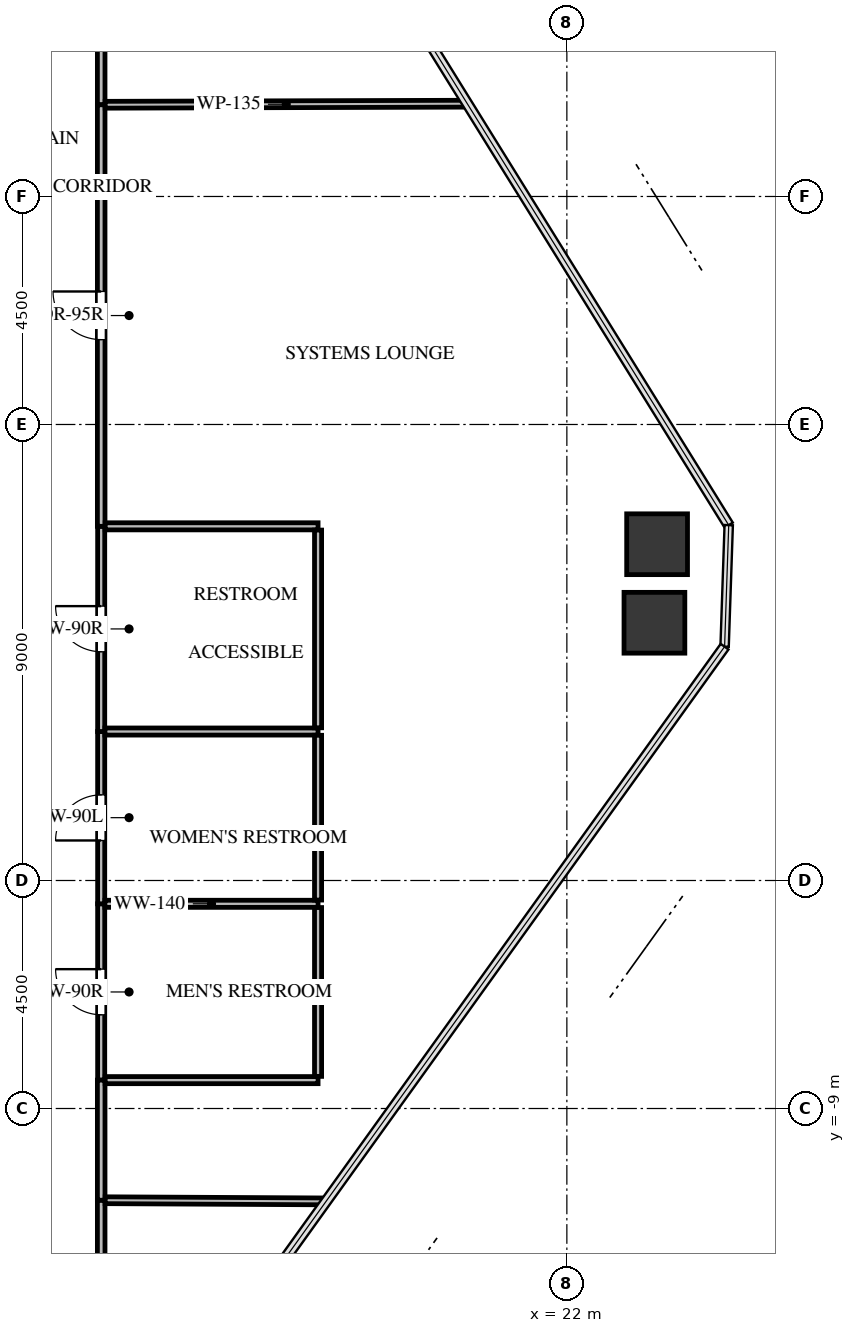
"""IFC4 building model, lengths in metres.
Left out: names, types, materials, properties, quantities, classifications, styles, units other than length and angle.
Written with IfcOpenShell. Run it as: python <this file> out.ifc"""

import sys

from ifc_helpers import new_model, si_unit, direction, frame, frame_2d, origin, origin_2d, place, context, subcontext, project, spatial, rectangle, extrude, source, transform, mapped, element, fill, save


model = new_model("IFC4")
c1 = context("Model", 3, precision=1e-05, world=origin(), true_north=direction((0.0, 1.0)))
c2 = subcontext(c1, "Body", "Model", "MODEL_VIEW")
j1 = project(units=[si_unit("LENGTHUNIT", "METRE"), si_unit("PLANEANGLEUNIT", "RADIAN")], contexts=[c1])
p1 = place(None, origin())
s1 = spatial("IfcSite", under=j1, at=p1, CompositionType="ELEMENT")
p2 = place(p1, origin())
s2 = spatial("IfcBuilding", under=s1, at=p2, CompositionType="ELEMENT")
p3 = place(p2, frame((0.0, 0.0, 100.8)))
s3 = spatial("IfcBuildingStorey", under=s2, at=p3, CompositionType="ELEMENT", Elevation=100.8)
m1 = source(origin(), c2, "Body", "SweptSolid", [
    extrude(rectangle(XDim=1.2, YDim=1.2, at=origin_2d()), origin(), (0.0, 0.0, 1.0), 3.3),
])
for number, where, z_axis, x_axis in (
    (1, (23.781, 2.137, -0.24), (0.0, 0.0, 1.0), (1.0, 0.0, 0.0)),
    (2, (23.728, 0.587, -0.24), (0.0, 0.0, 1.0), (1.0, 0.0, 0.0)),
):
    element("IfcColumn", number, at=place(p3, frame(where, z_axis=z_axis, x_axis=x_axis)), inside=s3, PredefinedType="COLUMN", context=c2, shape_type="MappedRepresentation", body=[
        mapped(m1, transform((0.0, 0.0, 0.0), x_axis=(1.0, 0.0, 0.0), y_axis=(0.0, 1.0, 0.0), z_axis=(0.0, 0.0, 1.0), scale=1.0)),
    ])
p4 = place(p3, frame((12.81, -8.44, 0.0), z_axis=(0.0, 0.0, 1.0), x_axis=(0.0, 1.0, 0.0)))
e3 = element("IfcWall", 3, at=p4, inside=s3, PredefinedType="PARTITIONING", context=c2, shape_type="SweptSolid", body=[
    extrude(rectangle(XDim=3.48, YDim=0.14, at=frame_2d((1.74, 0.0))), origin(), (0.0, 0.0, 1.0), 3.045),
])
p5 = place(p4, frame((1.29, 0.0, 0.0)))
e4 = element("IfcOpeningElement", 4, at=p5, cuts=e3, PredefinedType="OPENING", context=c2, shape_type="SweptSolid", body=[
    extrude(rectangle(XDim=0.9, YDim=2.05, at=frame_2d((0.45, 1.025))), frame((0.0, 0.08, 0.0), z_axis=(0.0, -1.0, 0.0), x_axis=(1.0, 0.0, 0.0)), (0.0, 0.0, 1.0), 0.16),
])
p6 = place(p3, frame((12.81, -4.96, 0.0), z_axis=(0.0, 0.0, 1.0), x_axis=(0.0, 1.0, 0.0)))
e5 = element("IfcWall", 5, at=p6, inside=s3, PredefinedType="PARTITIONING", context=c2, shape_type="SweptSolid", body=[
    extrude(rectangle(XDim=3.4, YDim=0.14, at=frame_2d((1.7, 0.0))), origin(), (0.0, 0.0, 1.0), 3.045),
])
p7 = place(p6, frame((1.25, 0.0, 0.0)))
e6 = element("IfcOpeningElement", 6, at=p7, cuts=e5, PredefinedType="OPENING", context=c2, shape_type="SweptSolid", body=[
    extrude(rectangle(XDim=0.9, YDim=2.05, at=frame_2d((0.45, 1.025))), frame((0.0, 0.08, 0.0), z_axis=(0.0, -1.0, 0.0), x_axis=(1.0, 0.0, 0.0)), (0.0, 0.0, 1.0), 0.16),
])
p8 = place(p3, frame((12.81, -1.56, 0.0), z_axis=(0.0, 0.0, 1.0), x_axis=(0.0, 1.0, 0.0)))
e7 = element("IfcWall", 7, at=p8, inside=s3, PredefinedType="PARTITIONING", context=c2, shape_type="SweptSolid", body=[
    extrude(rectangle(XDim=4.05, YDim=0.14, at=frame_2d((2.025, 0.0))), origin(), (0.0, 0.0, 1.0), 2.212),
])
p9 = place(p8, frame((1.575, 0.0, 0.0)))
e8 = element("IfcOpeningElement", 8, at=p9, cuts=e7, PredefinedType="OPENING", context=c2, shape_type="SweptSolid", body=[
    extrude(rectangle(XDim=0.9, YDim=2.05, at=frame_2d((0.45, 1.025))), frame((0.0, 0.08, 0.0), z_axis=(0.0, -1.0, 0.0), x_axis=(1.0, 0.0, 0.0)), (0.0, 0.0, 1.0), 0.16),
])
for number, where, z_axis, x_axis in (
    (9, (12.81, 10.81, 0.0), (0.0, 0.0, 1.0), (0.0, 1.0, 0.0)),
    (10, (12.81, -12.081, 0.0), (0.0, 0.0, 1.0), (0.0, 1.0, 0.0)),
):
    element("IfcWall", number, at=place(p3, frame(where, z_axis=z_axis, x_axis=x_axis)), inside=s3, PredefinedType="PARTITIONING", context=c2, shape_type="SweptSolid", body=[
        extrude(rectangle(XDim=1.271, YDim=0.15, at=frame_2d((0.635, 0.0))), origin(), (0.0, 0.0, 1.0), 3.045),
    ])
p10 = place(p3, frame((12.81, 2.49, 0.0), z_axis=(0.0, 0.0, 1.0), x_axis=(0.0, 1.0, 0.0)))
e11 = element("IfcWall", 11, at=p10, inside=s3, PredefinedType="PARTITIONING", context=c2, shape_type="SweptSolid", body=[
    extrude(rectangle(XDim=8.32, YDim=0.15, at=frame_2d((4.16, 0.0))), origin(), (0.0, 0.0, 1.0), 3.045),
])
p11 = place(p10, frame((3.685, 0.0, 0.0)))
e12 = element("IfcOpeningElement", 12, at=p11, cuts=e11, PredefinedType="OPENING", context=c2, shape_type="SweptSolid", body=[
    extrude(rectangle(XDim=0.95, YDim=2.1, at=frame_2d((0.475, 1.05))), frame((0.0, 0.085, 0.0), z_axis=(0.0, -1.0, 0.0), x_axis=(1.0, 0.0, 0.0)), (0.0, 0.0, 1.0), 0.17),
])
p12 = place(p3, frame((12.81, -10.81, 0.0), z_axis=(0.0, 0.0, 1.0), x_axis=(0.0, 1.0, 0.0)))
e13 = element("IfcWall", 13, at=p12, inside=s3, PredefinedType="PARTITIONING", context=c2, shape_type="SweptSolid", body=[
    extrude(rectangle(XDim=2.37, YDim=0.15, at=frame_2d((1.185, 0.0))), origin(), (0.0, 0.0, 1.0), 3.045),
])
p13 = place(p3, frame((12.884, -4.96, 0.0), z_axis=(0.0, 0.0, 1.0), x_axis=(1.0, 0.0, 0.0)))
e14 = element("IfcWall", 14, at=p13, inside=s3, PredefinedType="PARTITIONING", context=c2, shape_type="SweptSolid", body=[
    extrude(rectangle(XDim=4.206, YDim=0.14, at=frame_2d((2.103, 0.0))), origin(), (0.0, 0.0, 1.0), 3.045),
])
p14 = place(p3, frame((17.09, -8.44, 0.0), z_axis=(0.0, 0.0, 1.0), x_axis=(-1.0, 0.0, 0.0)))
e15 = element("IfcWall", 15, at=p14, inside=s3, PredefinedType="PARTITIONING", context=c2, shape_type="SweptSolid", body=[
    extrude(rectangle(XDim=4.201, YDim=0.14, at=frame_2d((2.101, 0.0))), origin(), (0.0, 0.0, 1.0), 2.38),
])
p15 = place(p3, frame((17.09, -5.034, 0.0), z_axis=(0.0, 0.0, 1.0), x_axis=(0.0, -1.0, 0.0)))
e16 = element("IfcWall", 16, at=p15, inside=s3, PredefinedType="PARTITIONING", context=c2, shape_type="SweptSolid", body=[
    extrude(rectangle(XDim=3.332, YDim=0.14, at=frame_2d((1.666, 0.0))), origin(), (0.0, 0.0, 1.0), 2.38),
])
p16 = place(p3, frame((12.884, -1.56, 0.0), z_axis=(0.0, 0.0, 1.0), x_axis=(1.0, 0.0, 0.0)))
e17 = element("IfcWall", 17, at=p16, inside=s3, PredefinedType="PARTITIONING", context=c2, shape_type="SweptSolid", body=[
    extrude(rectangle(XDim=4.206, YDim=0.14, at=frame_2d((2.103, 0.0))), origin(), (0.0, 0.0, 1.0), 3.045),
])
p17 = place(p3, frame((17.09, -1.634, 0.0), z_axis=(0.0, 0.0, 1.0), x_axis=(0.0, -1.0, 0.0)))
e18 = element("IfcWall", 18, at=p17, inside=s3, PredefinedType="PARTITIONING", context=c2, shape_type="SweptSolid", body=[
    extrude(rectangle(XDim=3.252, YDim=0.14, at=frame_2d((1.626, 0.0))), origin(), (0.0, 0.0, 1.0), 3.045),
])
p18 = place(p3, frame((12.889, 2.49, 0.0), z_axis=(0.0, 0.0, 1.0), x_axis=(1.0, 0.0, 0.0)))
e19 = element("IfcWall", 19, at=p18, inside=s3, PredefinedType="PARTITIONING", context=c2, shape_type="SweptSolid", body=[
    extrude(rectangle(XDim=4.201, YDim=0.14, at=frame_2d((2.101, 0.0))), origin(), (0.0, 0.0, 1.0), 3.045),
])
p19 = place(p3, frame((17.09, 2.416, 0.0), z_axis=(0.0, 0.0, 1.0), x_axis=(0.0, -1.0, 0.0)))
e20 = element("IfcWall", 20, at=p19, inside=s3, PredefinedType="PARTITIONING", context=c2, shape_type="SweptSolid", body=[
    extrude(rectangle(XDim=3.902, YDim=0.14, at=frame_2d((1.951, 0.0))), origin(), (0.0, 0.0, 1.0), 2.212),
])
p20 = place(p3, frame((20.035, 10.831, 0.0), z_axis=(0.0, 0.0, 1.0), x_axis=(-0.999995783715, -0.002903885812, 0.0)))
e21 = element("IfcWall", 21, at=p20, inside=s3, PredefinedType="PARTITIONING", context=c2, shape_type="SweptSolid", body=[
    extrude(rectangle(XDim=7.146, YDim=0.135, at=frame_2d((3.573, 0.0))), origin(), (0.0, 0.0, 1.0), 2.38),
])
p21 = place(p3, frame((12.889, -10.81, 0.0), z_axis=(0.0, 0.0, 1.0), x_axis=(0.999986140562, -0.005264853658, 0.0)))
e22 = element("IfcWall", 22, at=p21, inside=s3, PredefinedType="PARTITIONING", context=c2, shape_type="SweptSolid", body=[
    extrude(rectangle(XDim=4.359, YDim=0.135, at=frame_2d((2.179, 0.0))), origin(), (0.0, 0.0, 1.0), 2.38),
])
m2 = source(origin(), c2, "Body", "SweptSolid", [
    extrude(rectangle(XDim=0.9, YDim=2.05, at=frame_2d((0.45, 1.025))), frame((0.0, 0.025, 0.0), z_axis=(0.0, -1.0, 0.0), x_axis=(1.0, 0.0, 0.0)), (0.0, 0.0, 1.0), 0.05),
])
p22 = place(p5, origin())
e23 = element("IfcDoor", 23, at=p22, inside=s3, OperationType="SINGLE_SWING_RIGHT", PredefinedType="DOOR", context=c2, shape_type="MappedRepresentation", body=[
    mapped(m2, transform((0.0, 0.0, 0.0), x_axis=(1.0, 0.0, 0.0), y_axis=(0.0, 1.0, 0.0), z_axis=(0.0, 0.0, 1.0), scale=1.0)),
])
fill(e4, e23)
m3 = source(origin(), c2, "Body", "SweptSolid", [
    extrude(rectangle(XDim=0.9, YDim=2.05, at=frame_2d((0.45, 1.025))), frame((0.0, 0.025, 0.0), z_axis=(0.0, -1.0, 0.0), x_axis=(1.0, 0.0, 0.0)), (0.0, 0.0, 1.0), 0.05),
])
p23 = place(p7, origin())
e24 = element("IfcDoor", 24, at=p23, inside=s3, OperationType="SINGLE_SWING_LEFT", PredefinedType="DOOR", context=c2, shape_type="MappedRepresentation", body=[
    mapped(m3, transform((0.0, 0.0, 0.0), x_axis=(1.0, 0.0, 0.0), y_axis=(0.0, 1.0, 0.0), z_axis=(0.0, 0.0, 1.0), scale=1.0)),
])
fill(e6, e24)
p24 = place(p9, origin())
e25 = element("IfcDoor", 25, at=p24, inside=s3, OperationType="SINGLE_SWING_RIGHT", PredefinedType="DOOR", context=c2, shape_type="MappedRepresentation", body=[
    mapped(m2, transform((0.0, 0.0, 0.0), x_axis=(1.0, 0.0, 0.0), y_axis=(0.0, 1.0, 0.0), z_axis=(0.0, 0.0, 1.0), scale=1.0)),
])
fill(e8, e25)
m4 = source(origin(), c2, "Body", "SweptSolid", [
    extrude(rectangle(XDim=0.95, YDim=2.1, at=frame_2d((0.475, 1.05))), frame((0.0, 0.025, 0.0), z_axis=(0.0, -1.0, 0.0), x_axis=(1.0, 0.0, 0.0)), (0.0, 0.0, 1.0), 0.05),
])
p25 = place(p11, origin())
e26 = element("IfcDoor", 26, at=p25, inside=s3, OperationType="SINGLE_SWING_RIGHT", PredefinedType="DOOR", context=c2, shape_type="MappedRepresentation", body=[
    mapped(m4, transform((0.0, 0.0, 0.0), x_axis=(1.0, 0.0, 0.0), y_axis=(0.0, 1.0, 0.0), z_axis=(0.0, 0.0, 1.0), scale=1.0)),
])
fill(e12, e26)
save(model, sys.argv[1])
